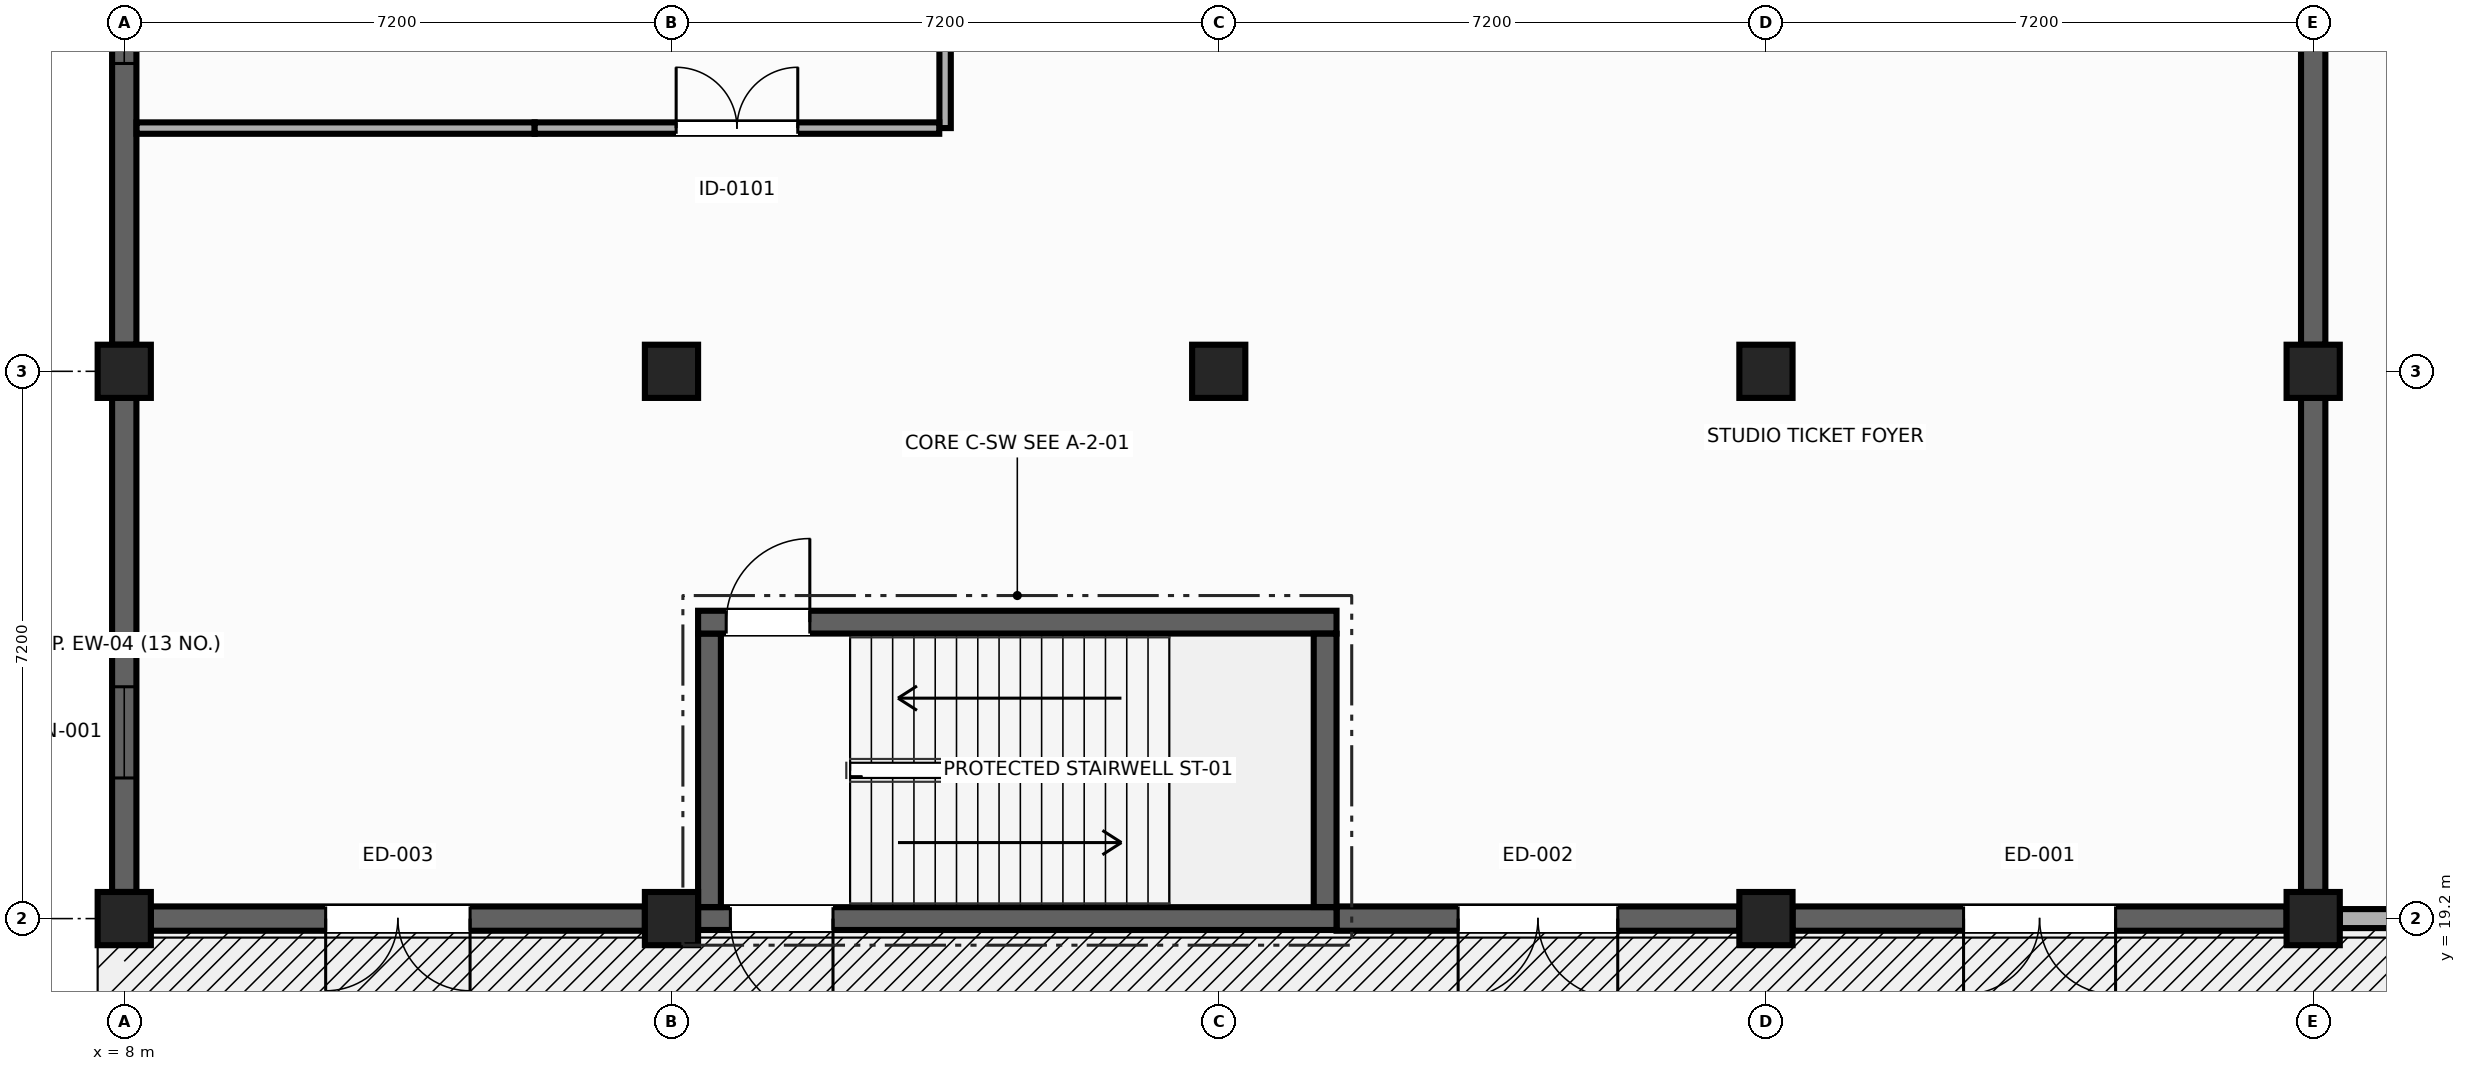
"""IFC4 building model, lengths in metres.
Left out: names, types, materials, properties, quantities, classifications, styles, units other than length and angle.
Written with IfcOpenShell. Run it as: python <this file> out.ifc"""

import sys

from ifc_helpers import new_model, si_unit, direction, frame, frame_2d, origin, origin_2d, place, context, subcontext, project, spatial, rectangle, extrude, element, fill, save


model = new_model("IFC4")
c1 = context("Model", 3, precision=1e-05, world=origin(), true_north=direction((0.0, 1.0)))
c2 = subcontext(c1, "Body", "Model", "MODEL_VIEW")
j1 = project(units=[si_unit("LENGTHUNIT", "METRE"), si_unit("PLANEANGLEUNIT", "RADIAN")], contexts=[c1])
p1 = place(None, origin())
s1 = spatial("IfcSite", under=j1, at=p1, CompositionType="ELEMENT")
p2 = place(p1, origin())
s2 = spatial("IfcBuilding", under=s1, at=p2, CompositionType="ELEMENT")
p3 = place(p2, origin())
s3 = spatial("IfcBuildingStorey", under=s2, at=p3, CompositionType="ELEMENT", Elevation=0.0)
for number, where, z_axis, x_axis in (
    (1, (8.0, 19.2, 0.0), (0.0, 0.0, 1.0), (0.0, 1.0, 0.0)),
    (2, (15.2, 19.2, 0.0), (0.0, 0.0, 1.0), (1.0, 0.0, 0.0)),
    (3, (29.6, 19.2, 0.0), (0.0, 0.0, 1.0), (1.0, 0.0, 0.0)),
    (4, (36.8, 19.2, 0.0), (0.0, 0.0, 1.0), (1.0, 0.0, 0.0)),
    (5, (8.0, 26.4, 0.0), (0.0, 0.0, 1.0), (1.0, 0.0, 0.0)),
    (6, (15.2, 26.4, 0.0), (0.0, 0.0, 1.0), (0.0, 1.0, 0.0)),
    (7, (22.4, 26.4, 0.0), (0.0, 0.0, 1.0), (1.0, 0.0, 0.0)),
    (8, (29.6, 26.4, 0.0), (0.0, 0.0, 1.0), (1.0, 0.0, 0.0)),
    (9, (36.8, 26.4, 0.0), (0.0, 0.0, 1.0), (0.0, 1.0, 0.0)),
):
    element("IfcColumn", number, at=place(p3, frame(where, z_axis=z_axis, x_axis=x_axis)), inside=s3, PredefinedType="COLUMN", context=c2, shape_type="SweptSolid", body=[
        extrude(rectangle(XDim=0.7, YDim=0.7, at=origin_2d()), origin(), (0.0, 0.0, 1.0), 5.4),
    ])
p4 = place(p3, frame((36.45, 19.2, 0.0), z_axis=(0.0, 0.0, 1.0), x_axis=(-1.0, 0.0, 0.0)))
e10 = element("IfcWall", 10, at=p4, inside=s3, PredefinedType="SOLIDWALL", context=c2, shape_type="SweptSolid", body=[
    extrude(rectangle(XDim=6.5, YDim=0.32, at=frame_2d((3.25, 0.0))), origin(), (0.0, 0.0, 1.0), 5.12),
])
p5 = place(p4, frame((2.25, 0.0, 0.0)))
e11 = element("IfcOpeningElement", 11, at=p5, cuts=e10, PredefinedType="OPENING", context=c2, shape_type="SweptSolid", body=[
    extrude(rectangle(XDim=2.0, YDim=2.4, at=frame_2d((1.0, 1.2))), frame((0.0, 0.17, 0.0), z_axis=(0.0, -1.0, 0.0), x_axis=(1.0, 0.0, 0.0)), (0.0, 0.0, 1.0), 0.34),
])
p6 = place(p3, frame((29.25, 19.2, 0.0), z_axis=(0.0, 0.0, 1.0), x_axis=(-1.0, 0.0, 0.0)))
e12 = element("IfcWall", 12, at=p6, inside=s3, PredefinedType="SOLIDWALL", context=c2, shape_type="SweptSolid", body=[
    extrude(rectangle(XDim=5.3, YDim=0.32, at=frame_2d((2.65, 0.0))), origin(), (0.0, 0.0, 1.0), 5.12),
])
p7 = place(p6, frame((1.6, 0.0, 0.0)))
e13 = element("IfcOpeningElement", 13, at=p7, cuts=e12, PredefinedType="OPENING", context=c2, shape_type="SweptSolid", body=[
    extrude(rectangle(XDim=2.1, YDim=2.4, at=frame_2d((1.05, 1.2))), frame((0.0, 0.17, 0.0), z_axis=(0.0, -1.0, 0.0), x_axis=(1.0, 0.0, 0.0)), (0.0, 0.0, 1.0), 0.34),
])
p8 = place(p3, frame((14.85, 19.2, 0.0), z_axis=(0.0, 0.0, 1.0), x_axis=(-1.0, 0.0, 0.0)))
e14 = element("IfcWall", 14, at=p8, inside=s3, PredefinedType="SOLIDWALL", context=c2, shape_type="SweptSolid", body=[
    extrude(rectangle(XDim=6.5, YDim=0.32, at=frame_2d((3.25, 0.0))), origin(), (0.0, 0.0, 1.0), 5.12),
])
p9 = place(p8, frame((2.3, 0.0, 0.0)))
e15 = element("IfcOpeningElement", 15, at=p9, cuts=e14, PredefinedType="OPENING", context=c2, shape_type="SweptSolid", body=[
    extrude(rectangle(XDim=1.9, YDim=2.3, at=frame_2d((0.95, 1.15))), frame((0.0, 0.17, 0.0), z_axis=(0.0, -1.0, 0.0), x_axis=(1.0, 0.0, 0.0)), (0.0, 0.0, 1.0), 0.34),
])
p10 = place(p3, frame((8.0, 19.55, 0.0), z_axis=(0.0, 0.0, 1.0), x_axis=(0.0, 1.0, 0.0)))
e16 = element("IfcWall", 16, at=p10, inside=s3, PredefinedType="SOLIDWALL", context=c2, shape_type="SweptSolid", body=[
    extrude(rectangle(XDim=6.5, YDim=0.32, at=frame_2d((3.25, 0.0))), origin(), (0.0, 0.0, 1.0), 5.12),
])
p11 = place(p10, frame((1.5, 0.0, 0.9)))
e17 = element("IfcOpeningElement", 17, at=p11, cuts=e16, PredefinedType="OPENING", context=c2, shape_type="SweptSolid", body=[
    extrude(rectangle(XDim=1.2, YDim=1.8, at=frame_2d((0.6, 0.9))), frame((0.0, 0.17, 0.0), z_axis=(0.0, -1.0, 0.0), x_axis=(1.0, 0.0, 0.0)), (0.0, 0.0, 1.0), 0.34),
])
p12 = place(p3, frame((8.0, 26.75, 0.0), z_axis=(0.0, 0.0, 1.0), x_axis=(0.0, 1.0, 0.0)))
e18 = element("IfcWall", 18, at=p12, inside=s3, PredefinedType="SOLIDWALL", context=c2, shape_type="SweptSolid", body=[
    extrude(rectangle(XDim=6.5, YDim=0.32, at=frame_2d((3.25, 0.0))), origin(), (0.0, 0.0, 1.0), 5.12),
])
p13 = place(p12, frame((3.7, 0.0, 0.9)))
e19 = element("IfcOpeningElement", 19, at=p13, cuts=e18, PredefinedType="OPENING", context=c2, shape_type="SweptSolid", body=[
    extrude(rectangle(XDim=1.4, YDim=1.8, at=frame_2d((0.7, 0.9))), frame((0.0, 0.17, 0.0), z_axis=(0.0, -1.0, 0.0), x_axis=(1.0, 0.0, 0.0)), (0.0, 0.0, 1.0), 0.34),
])
for number, where, z_axis, x_axis in (
    (20, (36.8, 33.25, 0.0), (0.0, 0.0, 1.0), (0.0, -1.0, 0.0)),
    (21, (36.8, 26.05, 0.0), (0.0, 0.0, 1.0), (0.0, -1.0, 0.0)),
):
    element("IfcWall", number, at=place(p3, frame(where, z_axis=z_axis, x_axis=x_axis)), inside=s3, PredefinedType="SOLIDWALL", context=c2, shape_type="SweptSolid", body=[
        extrude(rectangle(XDim=6.5, YDim=0.32, at=frame_2d((3.25, 0.0))), origin(), (0.0, 0.0, 1.0), 5.1),
    ])
p14 = place(p3, frame((43.65, 19.2, 0.0), z_axis=(0.0, 0.0, 1.0), x_axis=(-1.0, 0.0, 0.0)))
e22 = element("IfcWall", 22, at=p14, inside=s3, PredefinedType="SOLIDWALL", context=c2, shape_type="SweptSolid", body=[
    extrude(rectangle(XDim=6.5, YDim=0.25, at=frame_2d((3.25, 0.0))), origin(), (0.0, 0.0, 1.0), 4.395),
])
p15 = place(p14, frame((2.05, 0.0, 0.0)))
e23 = element("IfcOpeningElement", 23, at=p15, cuts=e22, PredefinedType="OPENING", context=c2, shape_type="SweptSolid", body=[
    extrude(rectangle(XDim=2.4, YDim=2.7, at=frame_2d((1.2, 1.35))), frame((0.0, 0.135, 0.0), z_axis=(0.0, -1.0, 0.0), x_axis=(1.0, 0.0, 0.0)), (0.0, 0.0, 1.0), 0.27),
])
p16 = place(p3, frame((23.95, 19.2, 0.0), z_axis=(0.0, 0.0, 1.0), x_axis=(-1.0, 0.0, 0.0)))
e24 = element("IfcWall", 24, at=p16, inside=s3, PredefinedType="SHEAR", context=c2, shape_type="SweptSolid", body=[
    extrude(rectangle(XDim=8.4, YDim=0.3, at=frame_2d((4.2, 0.0))), origin(), (0.0, 0.0, 1.0), 5.12),
])
p17 = place(p16, frame((6.625, 0.0, 0.0)))
e25 = element("IfcOpeningElement", 25, at=p17, cuts=e24, PredefinedType="OPENING", context=c2, shape_type="SweptSolid", body=[
    extrude(rectangle(XDim=1.35, YDim=2.2, at=frame_2d((0.675, 1.1))), frame((0.0, 0.16, 0.0), z_axis=(0.0, -1.0, 0.0), x_axis=(1.0, 0.0, 0.0)), (0.0, 0.0, 1.0), 0.32),
])
p18 = place(p3, frame((15.7, 19.352, 0.0), z_axis=(0.0, 0.0, 1.0), x_axis=(0.0, 1.0, 0.0)))
e26 = element("IfcWall", 26, at=p18, inside=s3, PredefinedType="SHEAR", context=c2, shape_type="SweptSolid", body=[
    extrude(rectangle(XDim=3.598, YDim=0.3, at=frame_2d((1.799, 0.0))), origin(), (0.0, 0.0, 1.0), 5.12),
])
p19 = place(p3, frame((15.55, 23.1, 0.0), z_axis=(0.0, 0.0, 1.0), x_axis=(1.0, 0.0, 0.0)))
e27 = element("IfcWall", 27, at=p19, inside=s3, PredefinedType="SHEAR", context=c2, shape_type="SweptSolid", body=[
    extrude(rectangle(XDim=8.4, YDim=0.3, at=frame_2d((4.2, 0.0))), origin(), (0.0, 0.0, 1.0), 5.12),
])
p20 = place(p19, frame((0.37, 0.0, 0.0)))
e28 = element("IfcOpeningElement", 28, at=p20, cuts=e27, PredefinedType="OPENING", context=c2, shape_type="SweptSolid", body=[
    extrude(rectangle(XDim=1.1, YDim=2.15, at=frame_2d((0.55, 1.075))), frame((0.0, 0.16, 0.0), z_axis=(0.0, -1.0, 0.0), x_axis=(1.0, 0.0, 0.0)), (0.0, 0.0, 1.0), 0.32),
])
p21 = place(p3, frame((23.8, 22.948, 0.0), z_axis=(0.0, 0.0, 1.0), x_axis=(0.0, -1.0, 0.0)))
e29 = element("IfcWall", 29, at=p21, inside=s3, PredefinedType="SHEAR", context=c2, shape_type="SweptSolid", body=[
    extrude(rectangle(XDim=3.596, YDim=0.3, at=frame_2d((1.798, 0.0))), origin(), (0.0, 0.0, 1.0), 5.12),
])
p22 = place(p3, frame((18.8, 29.6, 0.0), z_axis=(0.0, 0.0, 1.0), x_axis=(0.0, 1.0, 0.0)))
e30 = element("IfcWall", 30, at=p22, inside=s3, PredefinedType="PARTITIONING", context=c2, shape_type="SweptSolid", body=[
    extrude(rectangle(XDim=5.6, YDim=0.15, at=frame_2d((2.8, 0.0))), origin(), (0.0, 0.0, 1.0), 3.715),
])
p23 = place(p22, frame((1.8, 0.0, 1.1)))
e31 = element("IfcOpeningElement", 31, at=p23, cuts=e30, PredefinedType="OPENING", context=c2, shape_type="SweptSolid", body=[
    extrude(rectangle(XDim=2.0, YDim=1.1, at=frame_2d((1.0, 0.55))), frame((0.0, 0.085, 0.0), z_axis=(0.0, -1.0, 0.0), x_axis=(1.0, 0.0, 0.0)), (0.0, 0.0, 1.0), 0.17),
])
p24 = place(p3, frame((8.162, 29.6, 0.0), z_axis=(0.0, 0.0, 1.0), x_axis=(1.0, 0.0, 0.0)))
e32 = element("IfcWall", 32, at=p24, inside=s3, PredefinedType="PARTITIONING", context=c2, shape_type="SweptSolid", body=[
    extrude(rectangle(XDim=5.238, YDim=0.15, at=frame_2d((2.619, 0.0))), origin(), (0.0, 0.0, 1.0), 5.12),
])
p25 = place(p3, frame((13.4, 29.6, 0.0), z_axis=(0.0, 0.0, 1.0), x_axis=(1.0, 0.0, 0.0)))
e33 = element("IfcWall", 33, at=p25, inside=s3, PredefinedType="PARTITIONING", context=c2, shape_type="SweptSolid", body=[
    extrude(rectangle(XDim=5.323, YDim=0.15, at=frame_2d((2.662, 0.0))), origin(), (0.0, 0.0, 1.0), 4.315),
])
p26 = place(p25, frame((1.862, 0.0, 0.0)))
e34 = element("IfcOpeningElement", 34, at=p26, cuts=e33, PredefinedType="OPENING", context=c2, shape_type="SweptSolid", body=[
    extrude(rectangle(XDim=1.6, YDim=2.25, at=frame_2d((0.8, 1.125))), frame((0.0, 0.085, 0.0), z_axis=(0.0, -1.0, 0.0), x_axis=(1.0, 0.0, 0.0)), (0.0, 0.0, 1.0), 0.17),
])
p27 = place(p5, origin())
e35 = element("IfcDoor", 35, at=p27, inside=s3, OperationType="DOUBLE_DOOR_SINGLE_SWING", PredefinedType="DOOR", context=c2, shape_type="SweptSolid", body=[
    extrude(rectangle(XDim=2.0, YDim=2.4, at=frame_2d((1.0, 1.2))), frame((0.0, 0.025, 0.0), z_axis=(0.0, -1.0, 0.0), x_axis=(1.0, 0.0, 0.0)), (0.0, 0.0, 1.0), 0.05),
])
fill(e11, e35)
p28 = place(p7, origin())
e36 = element("IfcDoor", 36, at=p28, inside=s3, OperationType="DOUBLE_DOOR_SINGLE_SWING", PredefinedType="DOOR", context=c2, shape_type="SweptSolid", body=[
    extrude(rectangle(XDim=2.1, YDim=2.4, at=frame_2d((1.05, 1.2))), frame((0.0, 0.025, 0.0), z_axis=(0.0, -1.0, 0.0), x_axis=(1.0, 0.0, 0.0)), (0.0, 0.0, 1.0), 0.05),
])
fill(e13, e36)
p29 = place(p9, origin())
e37 = element("IfcDoor", 37, at=p29, inside=s3, OperationType="DOUBLE_DOOR_SINGLE_SWING", PredefinedType="DOOR", context=c2, shape_type="SweptSolid", body=[
    extrude(rectangle(XDim=1.9, YDim=2.3, at=frame_2d((0.95, 1.15))), frame((0.0, 0.025, 0.0), z_axis=(0.0, -1.0, 0.0), x_axis=(1.0, 0.0, 0.0)), (0.0, 0.0, 1.0), 0.05),
])
fill(e15, e37)
p30 = place(p11, origin())
e38 = element("IfcWindow", 38, at=p30, inside=s3, PartitioningType="SINGLE_PANEL", PredefinedType="WINDOW", context=c2, shape_type="SweptSolid", body=[
    extrude(rectangle(XDim=1.2, YDim=1.8, at=frame_2d((0.6, 0.9))), frame((0.0, 0.03, 0.0), z_axis=(0.0, -1.0, 0.0), x_axis=(1.0, 0.0, 0.0)), (0.0, 0.0, 1.0), 0.06),
])
fill(e17, e38)
p31 = place(p13, origin())
e39 = element("IfcWindow", 39, at=p31, inside=s3, PartitioningType="SINGLE_PANEL", PredefinedType="WINDOW", context=c2, shape_type="SweptSolid", body=[
    extrude(rectangle(XDim=1.4, YDim=1.8, at=frame_2d((0.7, 0.9))), frame((0.0, 0.03, 0.0), z_axis=(0.0, -1.0, 0.0), x_axis=(1.0, 0.0, 0.0)), (0.0, 0.0, 1.0), 0.06),
])
fill(e19, e39)
p32 = place(p17, origin())
e40 = element("IfcDoor", 40, at=p32, inside=s3, OperationType="SINGLE_SWING_LEFT", PredefinedType="DOOR", context=c2, shape_type="SweptSolid", body=[
    extrude(rectangle(XDim=1.35, YDim=2.2, at=frame_2d((0.675, 1.1))), frame((0.0, 0.025, 0.0), z_axis=(0.0, -1.0, 0.0), x_axis=(1.0, 0.0, 0.0)), (0.0, 0.0, 1.0), 0.05),
])
fill(e25, e40)
p33 = place(p20, origin())
e41 = element("IfcDoor", 41, at=p33, inside=s3, OperationType="SINGLE_SWING_RIGHT", PredefinedType="DOOR", context=c2, shape_type="SweptSolid", body=[
    extrude(rectangle(XDim=1.1, YDim=2.15, at=frame_2d((0.55, 1.075))), frame((0.0, 0.025, 0.0), z_axis=(0.0, -1.0, 0.0), x_axis=(1.0, 0.0, 0.0)), (0.0, 0.0, 1.0), 0.05),
])
fill(e28, e41)
p34 = place(p26, origin())
e42 = element("IfcDoor", 42, at=p34, inside=s3, OperationType="DOUBLE_DOOR_SINGLE_SWING", PredefinedType="DOOR", context=c2, shape_type="SweptSolid", body=[
    extrude(rectangle(XDim=1.6, YDim=2.25, at=frame_2d((0.8, 1.125))), frame((0.0, 0.025, 0.0), z_axis=(0.0, -1.0, 0.0), x_axis=(1.0, 0.0, 0.0)), (0.0, 0.0, 1.0), 0.05),
])
fill(e34, e42)
save(model, sys.argv[1])
